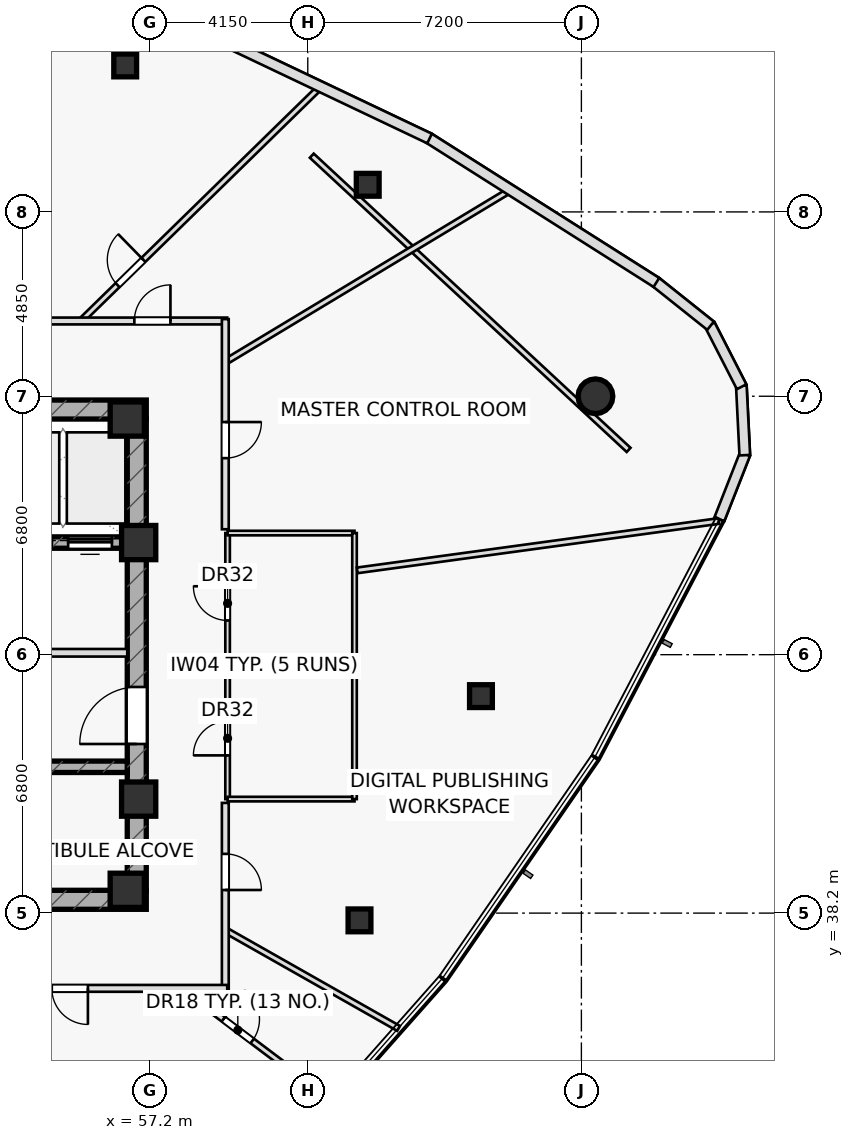
"""IFC4 building model, lengths in metres.
Left out: names, types, materials, properties, quantities, classifications, styles, units other than length and angle.
Written with IfcOpenShell. Run it as: python <this file> out.ifc"""

import sys

from ifc_helpers import new_model, si_unit, direction, frame, frame_2d, origin, origin_2d, place, context, subcontext, project, spatial, rectangle, hollow_rectangle, hollow_circle, extrude, element, fill, save


model = new_model("IFC4")
c1 = context("Model", 3, precision=1e-05, world=origin(), true_north=direction((0.0, 1.0)))
c2 = subcontext(c1, "Body", "Model", "MODEL_VIEW")
j1 = project(units=[si_unit("LENGTHUNIT", "METRE"), si_unit("PLANEANGLEUNIT", "RADIAN")], contexts=[c1])
p1 = place(None, origin())
s1 = spatial("IfcSite", under=j1, at=p1, CompositionType="ELEMENT")
p2 = place(p1, origin())
s2 = spatial("IfcBuilding", under=s1, at=p2, CompositionType="ELEMENT")
p3 = place(p2, frame((0.0, 0.0, 230.05)))
s3 = spatial("IfcBuildingStorey", under=s2, at=p3, CompositionType="ELEMENT", Elevation=230.05)
p4 = place(p3, frame((42.9, 51.45, 0.0), z_axis=(0.0, 0.0, 1.0), x_axis=(1.0, 0.0, 0.0)))
e1 = element("IfcWall", 1, at=p4, inside=s3, PredefinedType="SHEAR", context=c2, shape_type="SweptSolid", body=[
    extrude(rectangle(XDim=14.2, YDim=0.5, at=frame_2d((7.1, 0.0))), origin(), (0.0, 0.0, 1.0), 3.65),
])
p5 = place(p4, frame((0.78, 0.0, 0.0)))
e2 = element("IfcOpeningElement", 2, at=p5, cuts=e1, PredefinedType="OPENING", context=c2, shape_type="SweptSolid", body=[
    extrude(rectangle(XDim=1.05, YDim=2.2, at=frame_2d((0.525, 1.1))), frame((0.0, 0.26, 0.0), z_axis=(0.0, -1.0, 0.0), x_axis=(1.0, 0.0, 0.0)), (0.0, 0.0, 1.0), 0.52),
])
p6 = place(p3, frame((42.9, 38.55, 0.0), z_axis=(0.0, 0.0, 1.0), x_axis=(1.0, 0.0, 0.0)))
e3 = element("IfcWall", 3, at=p6, inside=s3, PredefinedType="SHEAR", context=c2, shape_type="SweptSolid", body=[
    extrude(rectangle(XDim=14.2, YDim=0.5, at=frame_2d((7.1, 0.0))), origin(), (0.0, 0.0, 1.0), 3.65),
])
p7 = place(p6, frame((0.78, 0.0, 0.0)))
e4 = element("IfcOpeningElement", 4, at=p7, cuts=e3, PredefinedType="OPENING", context=c2, shape_type="SweptSolid", body=[
    extrude(rectangle(XDim=1.05, YDim=2.2, at=frame_2d((0.525, 1.1))), frame((0.0, 0.26, 0.0), z_axis=(0.0, -1.0, 0.0), x_axis=(1.0, 0.0, 0.0)), (0.0, 0.0, 1.0), 0.52),
])
p8 = place(p3, frame((56.85, 38.8, 0.0), z_axis=(0.0, 0.0, 1.0), x_axis=(0.0, 1.0, 0.0)))
e5 = element("IfcWall", 5, at=p8, inside=s3, PredefinedType="SHEAR", context=c2, shape_type="SweptSolid", body=[
    extrude(rectangle(XDim=12.4, YDim=0.5, at=frame_2d((6.2, 0.0))), origin(), (0.0, 0.0, 1.0), 3.65),
])
p9 = place(p8, frame((3.85, 0.0, 0.0)))
e6 = element("IfcOpeningElement", 6, at=p9, cuts=e5, PredefinedType="OPENING", context=c2, shape_type="SweptSolid", body=[
    extrude(rectangle(XDim=1.5, YDim=2.2, at=frame_2d((0.75, 1.1))), frame((0.0, 0.26, 0.0), z_axis=(0.0, -1.0, 0.0), x_axis=(1.0, 0.0, 0.0)), (0.0, 0.0, 1.0), 0.52),
])
p10 = place(p3, frame((43.4, 47.95, 0.0), z_axis=(0.0, 0.0, 1.0), x_axis=(1.0, 0.0, 0.0)))
e7 = element("IfcWall", 7, at=p10, inside=s3, PredefinedType="SHEAR", context=c2, shape_type="SweptSolid", body=[
    extrude(rectangle(XDim=13.2, YDim=0.3, at=frame_2d((6.6, 0.0))), origin(), (0.0, 0.0, 1.0), 3.65),
])
p11 = place(p10, frame((8.345, 0.0, 0.0)))
e8 = element("IfcOpeningElement", 8, at=p11, cuts=e7, PredefinedType="OPENING", context=c2, shape_type="SweptSolid", body=[
    extrude(rectangle(XDim=1.15, YDim=2.2, at=frame_2d((0.575, 1.1))), frame((0.0, 0.16, 0.0), z_axis=(0.0, -1.0, 0.0), x_axis=(1.0, 0.0, 0.0)), (0.0, 0.0, 1.0), 0.32),
])
p12 = place(p10, frame((10.065, 0.0, 0.0)))
e9 = element("IfcOpeningElement", 9, at=p12, cuts=e7, PredefinedType="OPENING", context=c2, shape_type="SweptSolid", body=[
    extrude(rectangle(XDim=1.15, YDim=2.2, at=frame_2d((0.575, 1.1))), frame((0.0, 0.16, 0.0), z_axis=(0.0, -1.0, 0.0), x_axis=(1.0, 0.0, 0.0)), (0.0, 0.0, 1.0), 0.32),
])
p13 = place(p10, frame((11.645, 0.0, 0.0)))
e10 = element("IfcOpeningElement", 10, at=p13, cuts=e7, PredefinedType="OPENING", context=c2, shape_type="SweptSolid", body=[
    extrude(rectangle(XDim=1.15, YDim=2.2, at=frame_2d((0.575, 1.1))), frame((0.0, 0.16, 0.0), z_axis=(0.0, -1.0, 0.0), x_axis=(1.0, 0.0, 0.0)), (0.0, 0.0, 1.0), 0.32),
])
p14 = place(p3, frame((43.4, 42.05, 0.0), z_axis=(0.0, 0.0, 1.0), x_axis=(1.0, 0.0, 0.0)))
e11 = element("IfcWall", 11, at=p14, inside=s3, PredefinedType="SHEAR", context=c2, shape_type="SweptSolid", body=[
    extrude(rectangle(XDim=13.2, YDim=0.3, at=frame_2d((6.6, 0.0))), origin(), (0.0, 0.0, 1.0), 3.65),
])
p15 = place(p14, frame((9.1, 0.0, 0.0)))
e12 = element("IfcOpeningElement", 12, at=p15, cuts=e11, PredefinedType="OPENING", context=c2, shape_type="SweptSolid", body=[
    extrude(rectangle(XDim=1.5, YDim=2.2, at=frame_2d((0.75, 1.1))), frame((0.0, 0.16, 0.0), z_axis=(0.0, -1.0, 0.0), x_axis=(1.0, 0.0, 0.0)), (0.0, 0.0, 1.0), 0.32),
])
for number, where, z_axis, x_axis in (
    (13, (56.9, 47.95, 0.0), (0.0, 0.0, 1.0), (1.0, 0.0, 0.0)),
    (14, (56.6, 51.2, 0.0), (0.0, 0.0, 1.0), (1.0, 0.0, 0.0)),
    (15, (56.9, 41.2, 0.0), (0.0, 0.0, 1.0), (1.0, 0.0, 0.0)),
    (16, (56.6, 38.8, 0.0), (0.0, 0.0, 1.0), (1.0, 0.0, 0.0)),
):
    element("IfcColumn", number, at=place(p3, frame(where, z_axis=z_axis, x_axis=x_axis)), inside=s3, PredefinedType="COLUMN", context=c2, shape_type="SweptSolid", body=[
        extrude(rectangle(XDim=0.9, YDim=0.9, at=origin_2d()), origin(), (0.0, 0.0, 1.0), 3.65),
    ])
for number, where, z_axis, x_axis in (
    (17, (62.711, 38.009, 0.0), (0.0, 0.0, 1.0), (1.0, 0.0, 0.0)),
    (18, (65.907, 43.909, 0.0), (0.0, 0.0, 1.0), (1.0, 0.0, 0.0)),
):
    element("IfcColumn", number, at=place(p3, frame(where, z_axis=z_axis, x_axis=x_axis)), inside=s3, PredefinedType="COLUMN", context=c2, shape_type="SweptSolid", body=[
        extrude(hollow_rectangle(XDim=0.6, YDim=0.6, WallThickness=0.036, at=origin_2d()), origin(), (0.0, 0.0, 1.0), 3.65),
    ])
p16 = place(p3, frame((68.92, 51.799, 0.0), z_axis=(0.0, 0.0, 1.0), x_axis=(1.0, 0.0, 0.0)))
e19 = element("IfcColumn", 19, at=p16, inside=s3, PredefinedType="COLUMN", context=c2, shape_type="SweptSolid", body=[
    extrude(hollow_circle(Radius=0.457, WallThickness=0.04, at=origin_2d()), origin(), (0.0, 0.0, 1.0), 3.65),
])
for number, where, z_axis, x_axis in (
    (20, (62.927, 57.364, 0.0), (0.0, 0.0, 1.0), (1.0, 0.0, 0.0)),
    (21, (56.546, 60.504, 0.0), (0.0, 0.0, 1.0), (1.0, 0.0, 0.0)),
):
    element("IfcColumn", number, at=place(p3, frame(where, z_axis=z_axis, x_axis=x_axis)), inside=s3, PredefinedType="COLUMN", context=c2, shape_type="SweptSolid", body=[
        extrude(hollow_rectangle(XDim=0.6, YDim=0.6, WallThickness=0.036, at=origin_2d()), origin(), (0.0, 0.0, 1.0), 3.65),
    ])
p17 = place(p3, frame((50.65, 45.05, 0.0), z_axis=(0.0, 0.0, 1.0), x_axis=(1.0, 0.0, 0.0)))
e22 = element("IfcWall", 22, at=p17, inside=s3, PredefinedType="PARTITIONING", context=c2, shape_type="SweptSolid", body=[
    extrude(rectangle(XDim=5.95, YDim=0.2, at=frame_2d((2.975, 0.0))), origin(), (0.0, 0.0, 1.0), 3.65),
])
p18 = place(p17, frame((1.35, 0.0, 0.0)))
e23 = element("IfcOpeningElement", 23, at=p18, cuts=e22, PredefinedType="OPENING", context=c2, shape_type="SweptSolid", body=[
    extrude(rectangle(XDim=1.5, YDim=2.2, at=frame_2d((0.75, 1.1))), frame((0.0, 0.11, 0.0), z_axis=(0.0, -1.0, 0.0), x_axis=(1.0, 0.0, 0.0)), (0.0, 0.0, 1.0), 0.22),
])
p19 = place(p3, frame((69.792, 50.388, 0.0), z_axis=(0.0, 0.0, 1.0), x_axis=(-0.732769799181, 0.680476613418, 0.0)))
e24 = element("IfcWall", 24, at=p19, inside=s3, PredefinedType="PARTITIONING", context=c2, shape_type="SweptSolid", body=[
    extrude(rectangle(XDim=11.378, YDim=0.15, at=frame_2d((5.689, 0.0))), origin(), (0.0, 0.0, 1.0), 3.025),
])
p20 = place(p3, frame((59.24, 41.2, 0.0), z_axis=(0.0, 0.0, 1.0), x_axis=(0.0, 1.0, 0.0)))
e25 = element("IfcWall", 25, at=p20, inside=s3, PredefinedType="PARTITIONING", context=c2, shape_type="SweptSolid", body=[
    extrude(rectangle(XDim=7.0, YDim=0.12, at=frame_2d((3.5, 0.0))), origin(), (0.0, 0.0, 1.0), 3.65),
])
p21 = place(p20, frame((1.15, 0.0, 0.0)))
e26 = element("IfcOpeningElement", 26, at=p21, cuts=e25, PredefinedType="OPENING", context=c2, shape_type="SweptSolid", body=[
    extrude(rectangle(XDim=0.9, YDim=2.05, at=frame_2d((0.45, 1.025))), frame((0.0, 0.07, 0.0), z_axis=(0.0, -1.0, 0.0), x_axis=(1.0, 0.0, 0.0)), (0.0, 0.0, 1.0), 0.14),
])
p22 = place(p20, frame((4.7, 0.0, 0.0)))
e27 = element("IfcOpeningElement", 27, at=p22, cuts=e25, PredefinedType="OPENING", context=c2, shape_type="SweptSolid", body=[
    extrude(rectangle(XDim=0.9, YDim=2.05, at=frame_2d((0.45, 1.025))), frame((0.0, 0.07, 0.0), z_axis=(0.0, -1.0, 0.0), x_axis=(1.0, 0.0, 0.0)), (0.0, 0.0, 1.0), 0.14),
])
p23 = place(p3, frame((59.24, 41.2, 0.0), z_axis=(0.0, 0.0, 1.0), x_axis=(1.0, 0.0, 0.0)))
e28 = element("IfcWall", 28, at=p23, inside=s3, PredefinedType="PARTITIONING", context=c2, shape_type="SweptSolid", body=[
    extrude(rectangle(XDim=3.34, YDim=0.12, at=frame_2d((1.67, 0.0))), origin(), (0.0, 0.0, 1.0), 3.025),
])
for number, where, z_axis, x_axis in (
    (29, (59.24, 44.65, 0.0), (0.0, 0.0, 1.0), (1.0, 0.0, 0.0)),
    (30, (59.24, 48.2, 0.0), (0.0, 0.0, 1.0), (1.0, 0.0, 0.0)),
):
    element("IfcWall", number, at=place(p3, frame(where, z_axis=z_axis, x_axis=x_axis)), inside=s3, PredefinedType="PARTITIONING", context=c2, shape_type="SweptSolid", body=[
        extrude(rectangle(XDim=3.34, YDim=0.12, at=frame_2d((1.67, 0.0))), origin(), (0.0, 0.0, 1.0), 3.65),
    ])
p24 = place(p3, frame((62.58, 41.2, 0.0), z_axis=(0.0, 0.0, 1.0), x_axis=(0.0, 1.0, 0.0)))
e31 = element("IfcWall", 31, at=p24, inside=s3, PredefinedType="PARTITIONING", context=c2, shape_type="SweptSolid", body=[
    extrude(rectangle(XDim=7.0, YDim=0.12, at=frame_2d((3.5, 0.0))), origin(), (0.0, 0.0, 1.0), 3.325),
])
p25 = place(p3, frame((58.052, 36.22, 0.0), z_axis=(0.0, 0.0, 1.0), x_axis=(0.798637013942, -0.601813027411, 0.0)))
e32 = element("IfcWall", 32, at=p25, inside=s3, PredefinedType="PARTITIONING", context=c2, shape_type="SweptSolid", body=[
    extrude(rectangle(XDim=4.973, YDim=0.15, at=frame_2d((2.486, 0.0))), origin(), (0.0, 0.0, 1.0), 3.135),
])
p26 = place(p25, frame((1.35, 0.0, 0.0)))
e33 = element("IfcOpeningElement", 33, at=p26, cuts=e32, PredefinedType="OPENING", context=c2, shape_type="SweptSolid", body=[
    extrude(rectangle(XDim=0.95, YDim=2.05, at=frame_2d((0.475, 1.025))), frame((0.0, 0.085, 0.0), z_axis=(0.0, -1.0, 0.0), x_axis=(1.0, 0.0, 0.0)), (0.0, 0.0, 1.0), 0.17),
])
p27 = place(p3, frame((59.18, 37.752, 0.0), z_axis=(0.0, 0.0, 1.0), x_axis=(0.869846344998, -0.493322750432, 0.0)))
e34 = element("IfcWall", 34, at=p27, inside=s3, PredefinedType="PARTITIONING", context=c2, shape_type="SweptSolid", body=[
    extrude(rectangle(XDim=5.242, YDim=0.15, at=frame_2d((2.621, 0.0))), origin(), (0.0, 0.0, 1.0), 3.135),
])
p28 = place(p3, frame((62.65, 47.218, 0.0), z_axis=(0.0, 0.0, 1.0), x_axis=(0.990815623429, 0.135219822396, 0.0)))
e35 = element("IfcWall", 35, at=p28, inside=s3, PredefinedType="PARTITIONING", context=c2, shape_type="SweptSolid", body=[
    extrude(rectangle(XDim=9.605, YDim=0.15, at=frame_2d((4.803, 0.0))), origin(), (0.0, 0.0, 1.0), 3.135),
])
p29 = place(p3, frame((59.18, 52.703, 0.0), z_axis=(0.0, 0.0, 1.0), x_axis=(0.856455315382, 0.516221166511, 0.0)))
e36 = element("IfcWall", 36, at=p29, inside=s3, PredefinedType="PARTITIONING", context=c2, shape_type="SweptSolid", body=[
    extrude(rectangle(XDim=8.776, YDim=0.15, at=frame_2d((4.388, 0.0))), origin(), (0.0, 0.0, 1.0), 3.135),
])
p30 = place(p3, frame((55.38, 53.78, 0.0), z_axis=(0.0, 0.0, 1.0), x_axis=(0.715025713102, 0.699098154484, 0.0)))
e37 = element("IfcWall", 37, at=p30, inside=s3, PredefinedType="PARTITIONING", context=c2, shape_type="SweptSolid", body=[
    extrude(rectangle(XDim=8.829, YDim=0.15, at=frame_2d((4.415, 0.0))), origin(), (0.0, 0.0, 1.0), 3.025),
])
p31 = place(p30, frame((1.35, 0.0, 0.0)))
e38 = element("IfcOpeningElement", 38, at=p31, cuts=e37, PredefinedType="OPENING", context=c2, shape_type="SweptSolid", body=[
    extrude(rectangle(XDim=0.95, YDim=2.05, at=frame_2d((0.475, 1.025))), frame((0.0, 0.085, 0.0), z_axis=(0.0, -1.0, 0.0), x_axis=(1.0, 0.0, 0.0)), (0.0, 0.0, 1.0), 0.17),
])
p32 = place(p3, frame((51.89, 36.22, 0.0), z_axis=(0.0, 0.0, 1.0), x_axis=(0.530145730437, -0.847906542314, 0.0)))
e39 = element("IfcWall", 39, at=p32, inside=s3, PredefinedType="PARTITIONING", context=c2, shape_type="SweptSolid", body=[
    extrude(rectangle(XDim=9.418, YDim=0.15, at=frame_2d((4.709, 0.0))), origin(), (0.0, 0.0, 1.0), 3.025),
])
p33 = place(p3, frame((54.3, 53.78, 0.0), z_axis=(0.0, 0.0, 1.0), x_axis=(1.0, 0.0, 0.0)))
e40 = element("IfcWall", 40, at=p33, inside=s3, PredefinedType="PARTITIONING", context=c2, shape_type="SweptSolid", body=[
    extrude(rectangle(XDim=4.93, YDim=0.18, at=frame_2d((2.465, 0.0))), origin(), (0.0, 0.0, 1.0), 3.65),
])
p34 = place(p33, frame((2.486, 0.0, 0.0)))
e41 = element("IfcOpeningElement", 41, at=p34, cuts=e40, PredefinedType="OPENING", context=c2, shape_type="SweptSolid", body=[
    extrude(rectangle(XDim=0.95, YDim=2.05, at=frame_2d((0.475, 1.025))), frame((0.0, 0.1, 0.0), z_axis=(0.0, -1.0, 0.0), x_axis=(1.0, 0.0, 0.0)), (0.0, 0.0, 1.0), 0.2),
])
p35 = place(p3, frame((59.18, 53.83, 0.0), z_axis=(0.0, 0.0, 1.0), x_axis=(0.0, -1.0, 0.0)))
e42 = element("IfcWall", 42, at=p35, inside=s3, PredefinedType="PARTITIONING", context=c2, shape_type="SweptSolid", body=[
    extrude(rectangle(XDim=5.53, YDim=0.18, at=frame_2d((2.765, 0.0))), origin(), (0.0, 0.0, 1.0), 3.65),
])
p36 = place(p35, frame((2.709, 0.0, 0.0)))
e43 = element("IfcOpeningElement", 43, at=p36, cuts=e42, PredefinedType="OPENING", context=c2, shape_type="SweptSolid", body=[
    extrude(rectangle(XDim=0.95, YDim=2.05, at=frame_2d((0.475, 1.025))), frame((0.0, 0.1, 0.0), z_axis=(0.0, -1.0, 0.0), x_axis=(1.0, 0.0, 0.0)), (0.0, 0.0, 1.0), 0.2),
])
p37 = place(p3, frame((59.18, 41.1, 0.0), z_axis=(0.0, 0.0, 1.0), x_axis=(0.0, -1.0, 0.0)))
e44 = element("IfcWall", 44, at=p37, inside=s3, PredefinedType="PARTITIONING", context=c2, shape_type="SweptSolid", body=[
    extrude(rectangle(XDim=4.93, YDim=0.18, at=frame_2d((2.465, 0.0))), origin(), (0.0, 0.0, 1.0), 3.325),
])
p38 = place(p37, frame((1.342, 0.0, 0.0)))
e45 = element("IfcOpeningElement", 45, at=p38, cuts=e44, PredefinedType="OPENING", context=c2, shape_type="SweptSolid", body=[
    extrude(rectangle(XDim=0.95, YDim=2.05, at=frame_2d((0.475, 1.025))), frame((0.0, 0.1, 0.0), z_axis=(0.0, -1.0, 0.0), x_axis=(1.0, 0.0, 0.0)), (0.0, 0.0, 1.0), 0.2),
])
p39 = place(p3, frame((59.23, 36.22, 0.0), z_axis=(0.0, 0.0, 1.0), x_axis=(-1.0, 0.0, 0.0)))
e46 = element("IfcWall", 46, at=p39, inside=s3, PredefinedType="PARTITIONING", context=c2, shape_type="SweptSolid", body=[
    extrude(rectangle(XDim=19.48, YDim=0.18, at=frame_2d((9.74, 0.0))), origin(), (0.0, 0.0, 1.0), 3.025),
])
p40 = place(p39, frame((3.666, 0.0, 0.0)))
e47 = element("IfcOpeningElement", 47, at=p40, cuts=e46, PredefinedType="OPENING", context=c2, shape_type="SweptSolid", body=[
    extrude(rectangle(XDim=0.95, YDim=2.05, at=frame_2d((0.475, 1.025))), frame((0.0, 0.1, 0.0), z_axis=(0.0, -1.0, 0.0), x_axis=(1.0, 0.0, 0.0)), (0.0, 0.0, 1.0), 0.2),
])
p41 = place(p39, frame((9.579, 0.0, 0.0)))
e48 = element("IfcOpeningElement", 48, at=p41, cuts=e46, PredefinedType="OPENING", context=c2, shape_type="SweptSolid", body=[
    extrude(rectangle(XDim=0.95, YDim=2.05, at=frame_2d((0.475, 1.025))), frame((0.0, 0.1, 0.0), z_axis=(0.0, -1.0, 0.0), x_axis=(1.0, 0.0, 0.0)), (0.0, 0.0, 1.0), 0.2),
])
p42 = place(p39, frame((14.762, 0.0, 0.0)))
e49 = element("IfcOpeningElement", 49, at=p42, cuts=e46, PredefinedType="OPENING", context=c2, shape_type="SweptSolid", body=[
    extrude(rectangle(XDim=0.95, YDim=2.05, at=frame_2d((0.475, 1.025))), frame((0.0, 0.1, 0.0), z_axis=(0.0, -1.0, 0.0), x_axis=(1.0, 0.0, 0.0)), (0.0, 0.0, 1.0), 0.2),
])
p43 = place(p3, frame((72.18, 48.563, 0.0), z_axis=(0.0, 0.0, 1.0), x_axis=(0.365672868051, 0.930743441326, 0.0)))
e50 = element("IfcWall", 50, at=p43, inside=s3, PredefinedType="STANDARD", context=c2, shape_type="SweptSolid", body=[
    extrude(rectangle(XDim=1.843, YDim=0.28, at=frame_2d((0.921, 0.0))), origin(), (0.0, 0.0, 1.0), 3.65),
])
p44 = place(p3, frame((72.85, 50.249, 0.0), z_axis=(0.0, 0.0, 1.0), x_axis=(-0.049731472306, 0.998762624782, 0.0)))
e51 = element("IfcWall", 51, at=p44, inside=s3, PredefinedType="STANDARD", context=c2, shape_type="SweptSolid", body=[
    extrude(rectangle(XDim=1.831, YDim=0.28, at=frame_2d((0.916, 0.0))), origin(), (0.0, 0.0, 1.0), 3.65),
])
p45 = place(p3, frame((72.766, 52.05, 0.0), z_axis=(0.0, 0.0, 1.0), x_axis=(-0.45636266092, 0.889793864734, 0.0)))
e52 = element("IfcWall", 52, at=p45, inside=s3, PredefinedType="STANDARD", context=c2, shape_type="SweptSolid", body=[
    extrude(rectangle(XDim=1.831, YDim=0.28, at=frame_2d((0.916, 0.0))), origin(), (0.0, 0.0, 1.0), 3.65),
])
p46 = place(p3, frame((71.949, 53.656, 0.0), z_axis=(0.0, 0.0, 1.0), x_axis=(-0.782049521735, 0.62321629115, 0.0)))
e53 = element("IfcWall", 53, at=p46, inside=s3, PredefinedType="STANDARD", context=c2, shape_type="SweptSolid", body=[
    extrude(rectangle(XDim=1.854, YDim=0.28, at=frame_2d((0.927, 0.0))), origin(), (0.0, 0.0, 1.0), 3.65),
])
p47 = place(p3, frame((70.524, 54.794, 0.0), z_axis=(0.0, 0.0, 1.0), x_axis=(-0.844566618353, 0.535450489927, 0.0)))
e54 = element("IfcWall", 54, at=p47, inside=s3, PredefinedType="STANDARD", context=c2, shape_type="SweptSolid", body=[
    extrude(rectangle(XDim=7.099, YDim=0.28, at=frame_2d((3.549, 0.0))), origin(), (0.0, 0.0, 1.0), 3.65),
])
p48 = place(p3, frame((64.555, 58.581, 0.0), z_axis=(0.0, 0.0, 1.0), x_axis=(-0.903144953619, 0.429335757598, 0.0)))
e55 = element("IfcWall", 55, at=p48, inside=s3, PredefinedType="STANDARD", context=c2, shape_type="SweptSolid", body=[
    extrude(rectangle(XDim=7.087, YDim=0.28, at=frame_2d((3.543, 0.0))), origin(), (0.0, 0.0, 1.0), 3.65),
])
p49 = place(p9, origin())
e56 = element("IfcDoor", 56, at=p49, inside=s3, OperationType="SINGLE_SWING_LEFT", PredefinedType="DOOR", context=c2, shape_type="SweptSolid", body=[
    extrude(rectangle(XDim=1.5, YDim=2.2, at=frame_2d((0.75, 1.1))), frame((0.0, 0.025, 0.0), z_axis=(0.0, -1.0, 0.0), x_axis=(1.0, 0.0, 0.0)), (0.0, 0.0, 1.0), 0.05),
])
fill(e6, e56)
p50 = place(p21, origin())
e57 = element("IfcDoor", 57, at=p50, inside=s3, OperationType="SINGLE_SWING_LEFT", PredefinedType="DOOR", context=c2, shape_type="SweptSolid", body=[
    extrude(rectangle(XDim=0.9, YDim=2.05, at=frame_2d((0.45, 1.025))), frame((0.0, 0.025, 0.0), z_axis=(0.0, -1.0, 0.0), x_axis=(1.0, 0.0, 0.0)), (0.0, 0.0, 1.0), 0.05),
])
fill(e26, e57)
p51 = place(p22, origin())
e58 = element("IfcDoor", 58, at=p51, inside=s3, OperationType="SINGLE_SWING_RIGHT", PredefinedType="DOOR", context=c2, shape_type="SweptSolid", body=[
    extrude(rectangle(XDim=0.9, YDim=2.05, at=frame_2d((0.45, 1.025))), frame((0.0, 0.025, 0.0), z_axis=(0.0, -1.0, 0.0), x_axis=(1.0, 0.0, 0.0)), (0.0, 0.0, 1.0), 0.05),
])
fill(e27, e58)
p52 = place(p26, origin())
e59 = element("IfcDoor", 59, at=p52, inside=s3, OperationType="SINGLE_SWING_LEFT", PredefinedType="DOOR", context=c2, shape_type="SweptSolid", body=[
    extrude(rectangle(XDim=0.95, YDim=2.05, at=frame_2d((0.475, 1.025))), frame((0.0, 0.025, 0.0), z_axis=(0.0, -1.0, 0.0), x_axis=(1.0, 0.0, 0.0)), (0.0, 0.0, 1.0), 0.05),
])
fill(e33, e59)
p53 = place(p31, origin())
e60 = element("IfcDoor", 60, at=p53, inside=s3, OperationType="SINGLE_SWING_RIGHT", PredefinedType="DOOR", context=c2, shape_type="SweptSolid", body=[
    extrude(rectangle(XDim=0.95, YDim=2.05, at=frame_2d((0.475, 1.025))), frame((0.0, 0.025, 0.0), z_axis=(0.0, -1.0, 0.0), x_axis=(1.0, 0.0, 0.0)), (0.0, 0.0, 1.0), 0.05),
])
fill(e38, e60)
p54 = place(p34, origin())
e61 = element("IfcDoor", 61, at=p54, inside=s3, OperationType="SINGLE_SWING_RIGHT", PredefinedType="DOOR", context=c2, shape_type="SweptSolid", body=[
    extrude(rectangle(XDim=0.95, YDim=2.05, at=frame_2d((0.475, 1.025))), frame((0.0, 0.025, 0.0), z_axis=(0.0, -1.0, 0.0), x_axis=(1.0, 0.0, 0.0)), (0.0, 0.0, 1.0), 0.05),
])
fill(e41, e61)
p55 = place(p36, origin())
e62 = element("IfcDoor", 62, at=p55, inside=s3, OperationType="SINGLE_SWING_LEFT", PredefinedType="DOOR", context=c2, shape_type="SweptSolid", body=[
    extrude(rectangle(XDim=0.95, YDim=2.05, at=frame_2d((0.475, 1.025))), frame((0.0, 0.025, 0.0), z_axis=(0.0, -1.0, 0.0), x_axis=(1.0, 0.0, 0.0)), (0.0, 0.0, 1.0), 0.05),
])
fill(e43, e62)
p56 = place(p38, origin())
e63 = element("IfcDoor", 63, at=p56, inside=s3, OperationType="SINGLE_SWING_RIGHT", PredefinedType="DOOR", context=c2, shape_type="SweptSolid", body=[
    extrude(rectangle(XDim=0.95, YDim=2.05, at=frame_2d((0.475, 1.025))), frame((0.0, 0.025, 0.0), z_axis=(0.0, -1.0, 0.0), x_axis=(1.0, 0.0, 0.0)), (0.0, 0.0, 1.0), 0.05),
])
fill(e45, e63)
p57 = place(p40, origin())
e64 = element("IfcDoor", 64, at=p57, inside=s3, OperationType="SINGLE_SWING_LEFT", PredefinedType="DOOR", context=c2, shape_type="SweptSolid", body=[
    extrude(rectangle(XDim=0.95, YDim=2.05, at=frame_2d((0.475, 1.025))), frame((0.0, 0.025, 0.0), z_axis=(0.0, -1.0, 0.0), x_axis=(1.0, 0.0, 0.0)), (0.0, 0.0, 1.0), 0.05),
])
fill(e47, e64)
p58 = place(p13, origin())
e65 = element("IfcDoor", 65, at=p58, inside=s3, OperationType="SLIDING_TO_LEFT", PredefinedType="DOOR", context=c2, shape_type="SweptSolid", body=[
    extrude(rectangle(XDim=1.15, YDim=2.2, at=frame_2d((0.575, 1.1))), frame((0.0, 0.025, 0.0), z_axis=(0.0, -1.0, 0.0), x_axis=(1.0, 0.0, 0.0)), (0.0, 0.0, 1.0), 0.05),
])
fill(e10, e65)
save(model, sys.argv[1])
